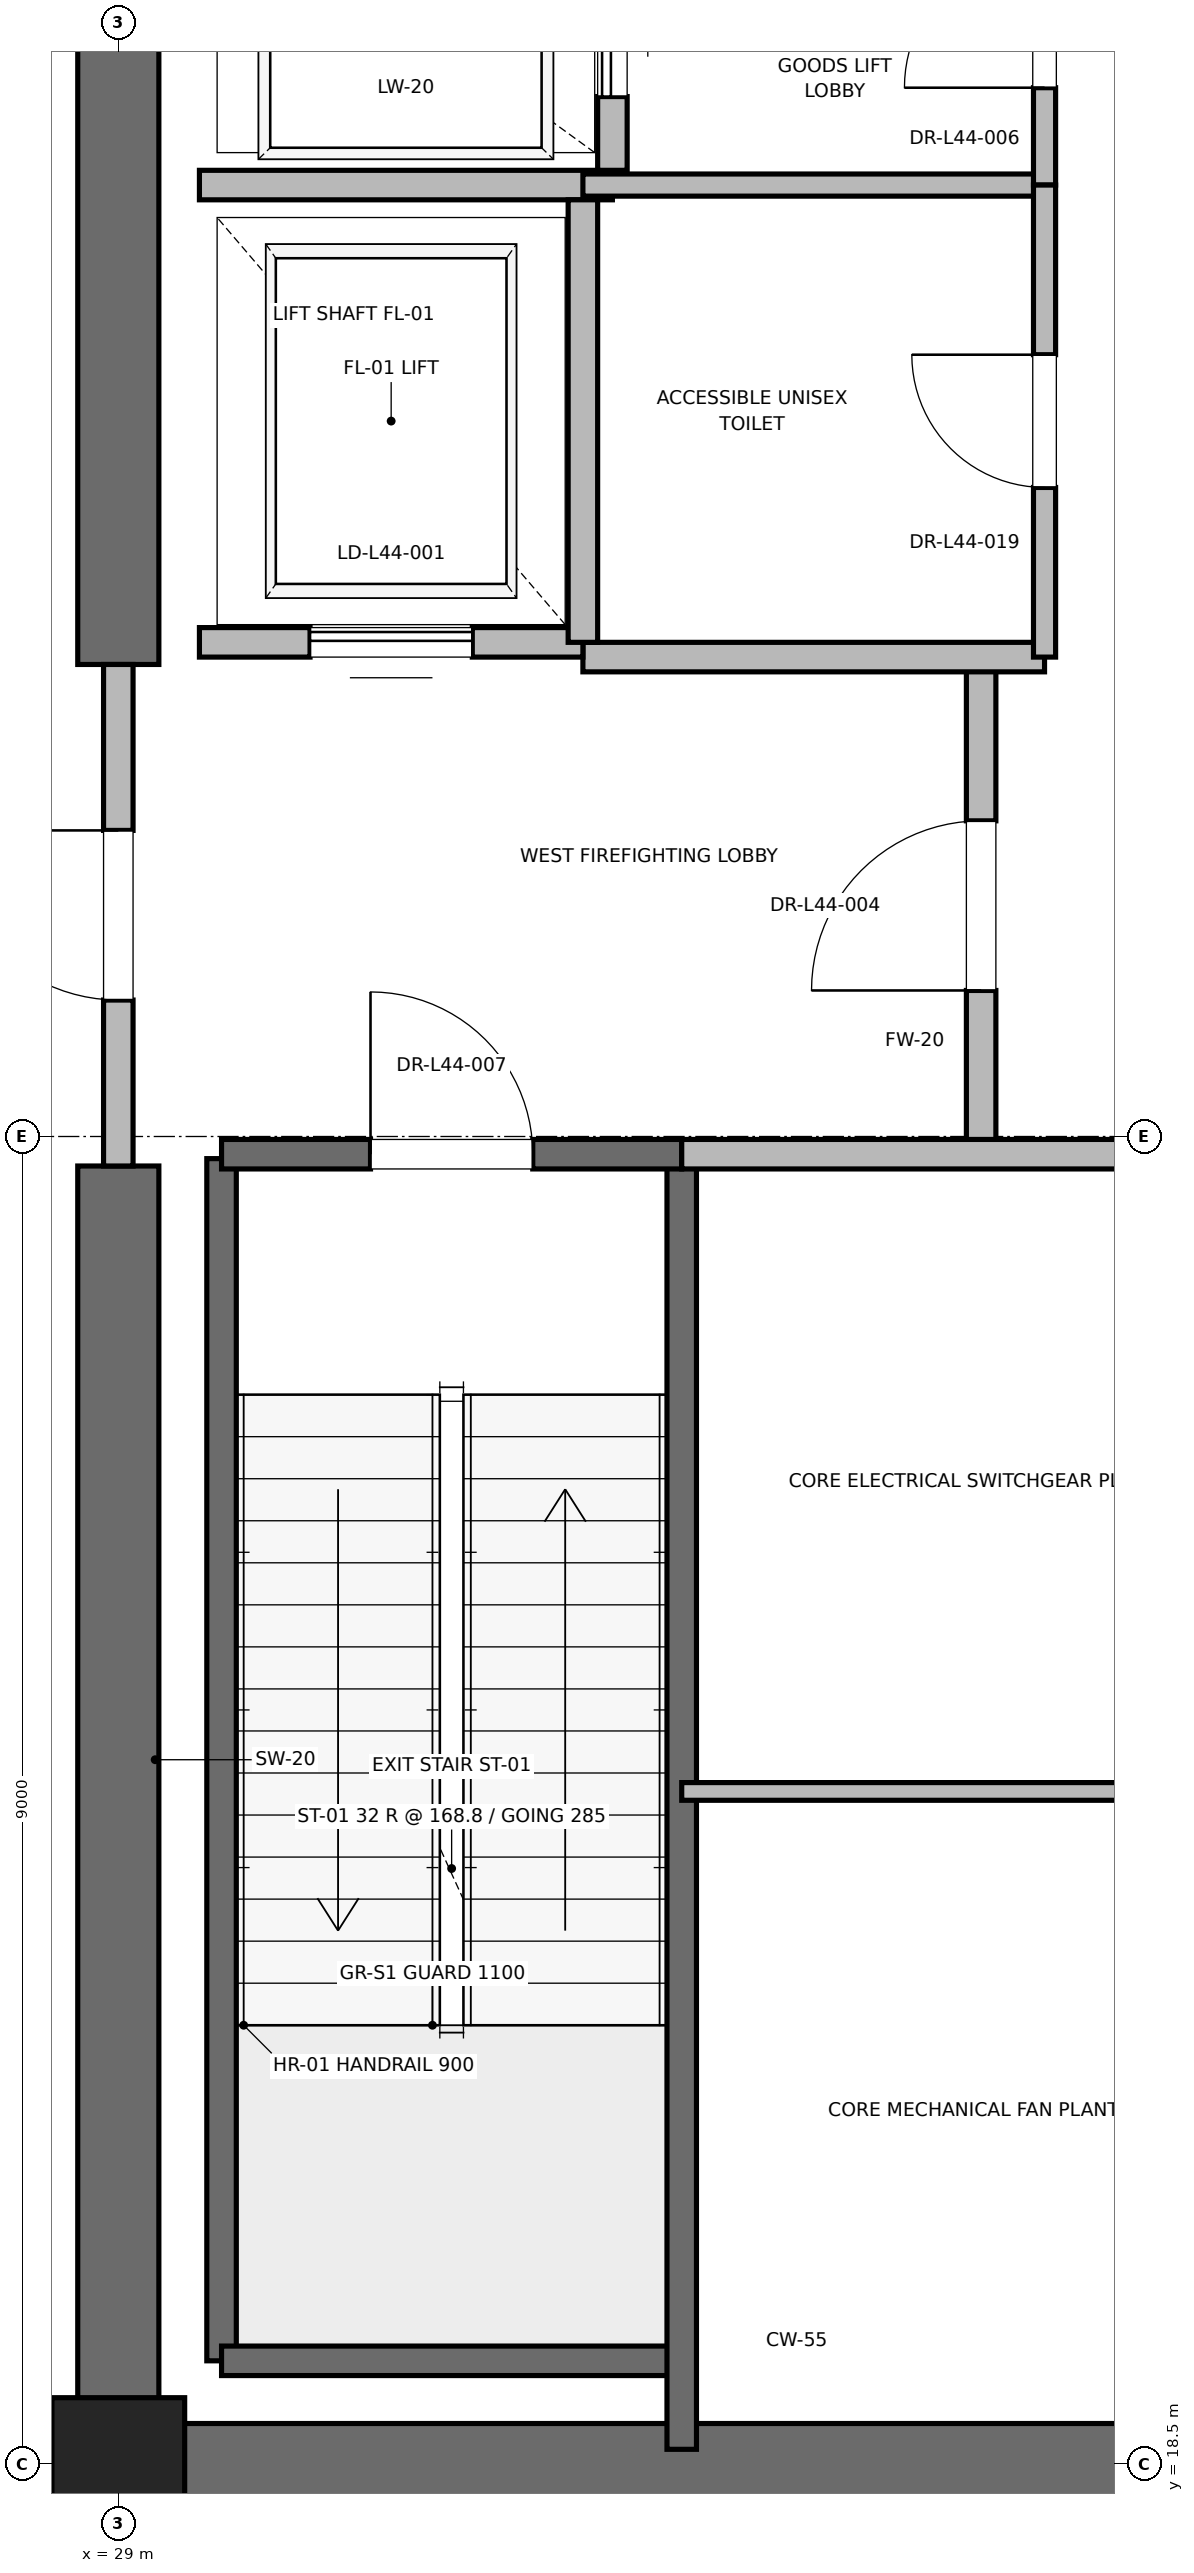
"""IFC4 building model, lengths in metres.
Left out: names, types, materials, properties, quantities, classifications, styles, units other than length and angle.
Written with IfcOpenShell. Run it as: python <this file> out.ifc"""

import sys

from ifc_helpers import new_model, si_unit, direction, frame, frame_2d, origin, origin_2d, place, context, subcontext, project, spatial, rectangle, extrude, element, fill, save


model = new_model("IFC4")
c1 = context("Model", 3, precision=1e-05, world=origin(), true_north=direction((0.0, 1.0)))
c2 = subcontext(c1, "Body", "Model", "MODEL_VIEW")
j1 = project(units=[si_unit("LENGTHUNIT", "METRE"), si_unit("PLANEANGLEUNIT", "RADIAN")], contexts=[c1])
p1 = place(None, origin())
s1 = spatial("IfcSite", under=j1, at=p1, CompositionType="ELEMENT")
p2 = place(p1, origin())
s2 = spatial("IfcBuilding", under=s1, at=p2, CompositionType="ELEMENT")
p3 = place(p2, frame((0.0, 0.0, 189.4)))
s3 = spatial("IfcBuildingStorey", under=s2, at=p3, CompositionType="ELEMENT", Elevation=189.4)
p4 = place(p3, frame((29.0, 18.5, 0.0), z_axis=(0.0, 0.0, 1.0), x_axis=(1.0, 0.0, 0.0)))
e1 = element("IfcColumn", 1, at=p4, inside=s3, PredefinedType="PILASTER", context=c2, shape_type="SweptSolid", body=[
    extrude(rectangle(XDim=0.9, YDim=0.9, at=origin_2d()), origin(), (0.0, 0.0, 1.0), 5.4),
])
p5 = place(p3, frame((29.0, 18.5, 0.0), z_axis=(0.0, 0.0, 1.0), x_axis=(1.0, 0.0, 0.0)))
e2 = element("IfcWall", 2, at=p5, inside=s3, PredefinedType="SHEAR", context=c2, shape_type="SweptSolid", body=[
    extrude(rectangle(XDim=9.2, YDim=0.55, at=frame_2d((4.6, 0.0))), origin(), (0.0, 0.0, 1.0), 5.1),
])
p6 = place(p3, frame((29.0, 18.5, 0.0), z_axis=(0.0, 0.0, 1.0), x_axis=(0.0, 1.0, 0.0)))
e3 = element("IfcWall", 3, at=p6, inside=s3, PredefinedType="SHEAR", context=c2, shape_type="SweptSolid", body=[
    extrude(rectangle(XDim=8.8, YDim=0.55, at=frame_2d((4.4, 0.0))), origin(), (0.0, 0.0, 1.0), 5.1),
])
p7 = place(p3, frame((29.0, 30.7, 0.0), z_axis=(0.0, 0.0, 1.0), x_axis=(0.0, 1.0, 0.0)))
e4 = element("IfcWall", 4, at=p7, inside=s3, PredefinedType="SHEAR", context=c2, shape_type="SweptSolid", body=[
    extrude(rectangle(XDim=5.8, YDim=0.55, at=frame_2d((2.9, 0.0))), origin(), (0.0, 0.0, 1.0), 5.1),
])
p8 = place(p3, frame((29.7, 19.2, 0.0), z_axis=(0.0, 0.0, 1.0), x_axis=(0.0, 1.0, 0.0)))
e5 = element("IfcWall", 5, at=p8, inside=s3, PredefinedType="SOLIDWALL", context=c2, shape_type="SweptSolid", body=[
    extrude(rectangle(XDim=8.15, YDim=0.2, at=frame_2d((4.075, 0.0))), origin(), (0.0, 0.0, 1.0), 5.1),
])
p9 = place(p3, frame((29.7, 19.2, 0.0), z_axis=(0.0, 0.0, 1.0), x_axis=(1.0, 0.0, 0.0)))
e6 = element("IfcWall", 6, at=p9, inside=s3, PredefinedType="SOLIDWALL", context=c2, shape_type="SweptSolid", body=[
    extrude(rectangle(XDim=3.12, YDim=0.2, at=frame_2d((1.56, 0.0))), origin(), (0.0, 0.0, 1.0), 5.1),
])
p10 = place(p3, frame((32.82, 18.6, 0.0), z_axis=(0.0, 0.0, 1.0), x_axis=(0.0, 1.0, 0.0)))
e7 = element("IfcWall", 7, at=p10, inside=s3, PredefinedType="SOLIDWALL", context=c2, shape_type="SweptSolid", body=[
    extrude(rectangle(XDim=8.78, YDim=0.2, at=frame_2d((4.39, 0.0))), origin(), (0.0, 0.0, 1.0), 5.1),
])
p11 = place(p3, frame((29.7, 27.38, 0.0), z_axis=(0.0, 0.0, 1.0), x_axis=(1.0, 0.0, 0.0)))
e8 = element("IfcWall", 8, at=p11, inside=s3, PredefinedType="SOLIDWALL", context=c2, shape_type="SweptSolid", body=[
    extrude(rectangle(XDim=3.12, YDim=0.2, at=frame_2d((1.56, 0.0))), origin(), (0.0, 0.0, 1.0), 5.1),
])
p12 = place(p11, frame((1.01, 0.0, 0.0)))
e9 = element("IfcOpeningElement", 9, at=p12, cuts=e8, PredefinedType="OPENING", context=c2, shape_type="SweptSolid", body=[
    extrude(rectangle(XDim=1.1, YDim=2.15, at=frame_2d((0.55, 1.075))), frame((0.0, 0.1, 0.0), z_axis=(0.0, -1.0, 0.0), x_axis=(1.0, 0.0, 0.0)), (0.0, 0.0, 1.0), 0.2),
])
p13 = place(p3, frame((34.85, 27.38, 0.0), z_axis=(0.0, 0.0, 1.0), x_axis=(0.0, 1.0, 0.0)))
e10 = element("IfcWall", 10, at=p13, inside=s3, PredefinedType="PARTITIONING", context=c2, shape_type="SweptSolid", body=[
    extrude(rectangle(XDim=3.37, YDim=0.2, at=frame_2d((1.685, 0.0))), origin(), (0.0, 0.0, 1.0), 5.1),
])
p14 = place(p13, frame((1.11, 0.0, 0.0)))
e11 = element("IfcOpeningElement", 11, at=p14, cuts=e10, PredefinedType="OPENING", context=c2, shape_type="SweptSolid", body=[
    extrude(rectangle(XDim=1.15, YDim=2.2, at=frame_2d((0.575, 1.1))), frame((0.0, 0.1, 0.0), z_axis=(0.0, -1.0, 0.0), x_axis=(1.0, 0.0, 0.0)), (0.0, 0.0, 1.0), 0.2),
])
p15 = place(p3, frame((29.0, 27.3, 0.0), z_axis=(0.0, 0.0, 1.0), x_axis=(0.0, 1.0, 0.0)))
e12 = element("IfcWall", 12, at=p15, inside=s3, PredefinedType="PARTITIONING", context=c2, shape_type="SweptSolid", body=[
    extrude(rectangle(XDim=3.4, YDim=0.2, at=frame_2d((1.7, 0.0))), origin(), (0.0, 0.0, 1.0), 4.08),
])
p16 = place(p15, frame((1.125, 0.0, 0.0)))
e13 = element("IfcOpeningElement", 13, at=p16, cuts=e12, PredefinedType="OPENING", context=c2, shape_type="SweptSolid", body=[
    extrude(rectangle(XDim=1.15, YDim=2.2, at=frame_2d((0.575, 1.1))), frame((0.0, 0.1, 0.0), z_axis=(0.0, -1.0, 0.0), x_axis=(1.0, 0.0, 0.0)), (0.0, 0.0, 1.0), 0.2),
])
p17 = place(p3, frame((32.82, 27.38, 0.0), z_axis=(0.0, 0.0, 1.0), x_axis=(1.0, 0.0, 0.0)))
e14 = element("IfcWall", 14, at=p17, inside=s3, PredefinedType="PARTITIONING", context=c2, shape_type="SweptSolid", body=[
    extrude(rectangle(XDim=5.62, YDim=0.2, at=frame_2d((2.81, 0.0))), origin(), (0.0, 0.0, 1.0), 5.1),
])
p18 = place(p3, frame((32.15, 30.75, 0.0), z_axis=(0.0, 0.0, 1.0), x_axis=(1.0, 0.0, 0.0)))
e15 = element("IfcWall", 15, at=p18, inside=s3, PredefinedType="PARTITIONING", context=c2, shape_type="SweptSolid", body=[
    extrude(rectangle(XDim=3.13, YDim=0.2, at=frame_2d((1.565, 0.0))), origin(), (0.0, 0.0, 1.0), 5.1),
])
p19 = place(p3, frame((29.55, 30.85, 0.0), z_axis=(0.0, 0.0, 1.0), x_axis=(1.0, 0.0, 0.0)))
e16 = element("IfcWall", 16, at=p19, inside=s3, PredefinedType="SOLIDWALL", context=c2, shape_type="SweptSolid", body=[
    extrude(rectangle(XDim=2.6, YDim=0.2, at=frame_2d((1.3, 0.0))), origin(), (0.0, 0.0, 1.0), 4.08),
])
p20 = place(p19, frame((0.75, 0.0, 0.0)))
e17 = element("IfcOpeningElement", 17, at=p20, cuts=e16, PredefinedType="OPENING", context=c2, shape_type="SweptSolid", body=[
    extrude(rectangle(XDim=1.1, YDim=2.2, at=frame_2d((0.55, 1.1))), frame((0.0, 0.1, 0.0), z_axis=(0.0, -1.0, 0.0), x_axis=(1.0, 0.0, 0.0)), (0.0, 0.0, 1.0), 0.2),
])
p21 = place(p3, frame((29.55, 33.95, 0.0), z_axis=(0.0, 0.0, 1.0), x_axis=(1.0, 0.0, 0.0)))
e18 = element("IfcWall", 18, at=p21, inside=s3, PredefinedType="SOLIDWALL", context=c2, shape_type="SweptSolid", body=[
    extrude(rectangle(XDim=2.8, YDim=0.2, at=frame_2d((1.4, 0.0))), origin(), (0.0, 0.0, 1.0), 5.1),
])
p22 = place(p3, frame((32.15, 30.85, 0.0), z_axis=(0.0, 0.0, 1.0), x_axis=(0.0, 1.0, 0.0)))
e19 = element("IfcWall", 19, at=p22, inside=s3, PredefinedType="SOLIDWALL", context=c2, shape_type="SweptSolid", body=[
    extrude(rectangle(XDim=3.0, YDim=0.2, at=frame_2d((1.5, 0.0))), origin(), (0.0, 0.0, 1.0), 5.1),
])
p23 = place(p3, frame((32.35, 34.05, 0.0), z_axis=(0.0, 0.0, 1.0), x_axis=(0.0, 1.0, 0.0)))
e20 = element("IfcWall", 20, at=p23, inside=s3, PredefinedType="SOLIDWALL", context=c2, shape_type="SweptSolid", body=[
    extrude(rectangle(XDim=2.1, YDim=0.2, at=frame_2d((1.05, 0.0))), origin(), (0.0, 0.0, 1.0), 5.1),
])
p24 = place(p23, frame((0.5, 0.0, 0.0)))
e21 = element("IfcOpeningElement", 21, at=p24, cuts=e20, PredefinedType="OPENING", context=c2, shape_type="SweptSolid", body=[
    extrude(rectangle(XDim=1.1, YDim=2.2, at=frame_2d((0.55, 1.1))), frame((0.0, 0.1, 0.0), z_axis=(0.0, -1.0, 0.0), x_axis=(1.0, 0.0, 0.0)), (0.0, 0.0, 1.0), 0.2),
])
p25 = place(p3, frame((32.15, 33.95, 0.0), z_axis=(0.0, 0.0, 1.0), x_axis=(1.0, 0.0, 0.0)))
e22 = element("IfcWall", 22, at=p25, inside=s3, PredefinedType="PARTITIONING", context=c2, shape_type="SweptSolid", body=[
    extrude(rectangle(XDim=3.13, YDim=0.15, at=frame_2d((1.565, 0.0))), origin(), (0.0, 0.0, 1.0), 2.85),
])
p26 = place(p3, frame((35.28, 33.95, 0.0), z_axis=(0.0, 0.0, 1.0), x_axis=(0.0, 1.0, 0.0)))
e23 = element("IfcWall", 23, at=p26, inside=s3, PredefinedType="PARTITIONING", context=c2, shape_type="SweptSolid", body=[
    extrude(rectangle(XDim=2.27, YDim=0.15, at=frame_2d((1.135, 0.0))), origin(), (0.0, 0.0, 1.0), 2.85),
])
p27 = place(p26, frame((0.66, 0.0, 0.0)))
e24 = element("IfcOpeningElement", 24, at=p27, cuts=e23, PredefinedType="OPENING", context=c2, shape_type="SweptSolid", body=[
    extrude(rectangle(XDim=0.95, YDim=2.15, at=frame_2d((0.475, 1.075))), frame((0.0, 0.075, 0.0), z_axis=(0.0, -1.0, 0.0), x_axis=(1.0, 0.0, 0.0)), (0.0, 0.0, 1.0), 0.15),
])
p28 = place(p3, frame((35.28, 30.75, 0.0), z_axis=(0.0, 0.0, 1.0), x_axis=(0.0, 1.0, 0.0)))
e25 = element("IfcWall", 25, at=p28, inside=s3, PredefinedType="PARTITIONING", context=c2, shape_type="SweptSolid", body=[
    extrude(rectangle(XDim=3.2, YDim=0.15, at=frame_2d((1.6, 0.0))), origin(), (0.0, 0.0, 1.0), 2.85),
])
p29 = place(p28, frame((1.15, 0.0, 0.0)))
e26 = element("IfcOpeningElement", 26, at=p29, cuts=e25, PredefinedType="OPENING", context=c2, shape_type="SweptSolid", body=[
    extrude(rectangle(XDim=0.9, YDim=2.1, at=frame_2d((0.45, 1.05))), frame((0.0, 0.075, 0.0), z_axis=(0.0, -1.0, 0.0), x_axis=(1.0, 0.0, 0.0)), (0.0, 0.0, 1.0), 0.15),
])
p30 = place(p3, frame((32.82, 23.06, 0.0), z_axis=(0.0, 0.0, 1.0), x_axis=(1.0, 0.0, 0.0)))
e27 = element("IfcWall", 27, at=p30, inside=s3, PredefinedType="PARTITIONING", context=c2, shape_type="SweptSolid", body=[
    extrude(rectangle(XDim=5.23, YDim=0.12, at=frame_2d((2.615, 0.0))), origin(), (0.0, 0.0, 1.0), 2.85),
])
p31 = place(p12, origin())
e28 = element("IfcDoor", 28, at=p31, inside=s3, OperationType="SINGLE_SWING_LEFT", PredefinedType="DOOR", context=c2, shape_type="SweptSolid", body=[
    extrude(rectangle(XDim=1.1, YDim=2.15, at=frame_2d((0.55, 1.075))), frame((0.0, 0.025, 0.0), z_axis=(0.0, -1.0, 0.0), x_axis=(1.0, 0.0, 0.0)), (0.0, 0.0, 1.0), 0.05),
])
fill(e9, e28)
p32 = place(p14, origin())
e29 = element("IfcDoor", 29, at=p32, inside=s3, OperationType="SINGLE_SWING_LEFT", PredefinedType="DOOR", context=c2, shape_type="SweptSolid", body=[
    extrude(rectangle(XDim=1.15, YDim=2.2, at=frame_2d((0.575, 1.1))), frame((0.0, 0.025, 0.0), z_axis=(0.0, -1.0, 0.0), x_axis=(1.0, 0.0, 0.0)), (0.0, 0.0, 1.0), 0.05),
])
fill(e11, e29)
p33 = place(p16, origin())
e30 = element("IfcDoor", 30, at=p33, inside=s3, OperationType="SINGLE_SWING_RIGHT", PredefinedType="DOOR", context=c2, shape_type="SweptSolid", body=[
    extrude(rectangle(XDim=1.15, YDim=2.2, at=frame_2d((0.575, 1.1))), frame((0.0, 0.025, 0.0), z_axis=(0.0, -1.0, 0.0), x_axis=(1.0, 0.0, 0.0)), (0.0, 0.0, 1.0), 0.05),
])
fill(e13, e30)
p34 = place(p20, origin())
e31 = element("IfcDoor", 31, at=p34, inside=s3, OperationType="SLIDING_TO_RIGHT", PredefinedType="DOOR", context=c2, shape_type="SweptSolid", body=[
    extrude(rectangle(XDim=1.1, YDim=2.2, at=frame_2d((0.55, 1.1))), frame((0.0, 0.025, 0.0), z_axis=(0.0, -1.0, 0.0), x_axis=(1.0, 0.0, 0.0)), (0.0, 0.0, 1.0), 0.05),
])
fill(e17, e31)
p35 = place(p24, origin())
e32 = element("IfcDoor", 32, at=p35, inside=s3, OperationType="SLIDING_TO_RIGHT", PredefinedType="DOOR", context=c2, shape_type="SweptSolid", body=[
    extrude(rectangle(XDim=1.1, YDim=2.2, at=frame_2d((0.55, 1.1))), frame((0.0, 0.025, 0.0), z_axis=(0.0, -1.0, 0.0), x_axis=(1.0, 0.0, 0.0)), (0.0, 0.0, 1.0), 0.05),
])
fill(e21, e32)
p36 = place(p27, origin())
e33 = element("IfcDoor", 33, at=p36, inside=s3, OperationType="SINGLE_SWING_LEFT", PredefinedType="DOOR", context=c2, shape_type="SweptSolid", body=[
    extrude(rectangle(XDim=0.95, YDim=2.15, at=frame_2d((0.475, 1.075))), frame((0.0, 0.025, 0.0), z_axis=(0.0, -1.0, 0.0), x_axis=(1.0, 0.0, 0.0)), (0.0, 0.0, 1.0), 0.05),
])
fill(e24, e33)
p37 = place(p29, origin())
e34 = element("IfcDoor", 34, at=p37, inside=s3, OperationType="SINGLE_SWING_RIGHT", PredefinedType="DOOR", context=c2, shape_type="SweptSolid", body=[
    extrude(rectangle(XDim=0.9, YDim=2.1, at=frame_2d((0.45, 1.05))), frame((0.0, 0.025, 0.0), z_axis=(0.0, -1.0, 0.0), x_axis=(1.0, 0.0, 0.0)), (0.0, 0.0, 1.0), 0.05),
])
fill(e26, e34)
save(model, sys.argv[1])
